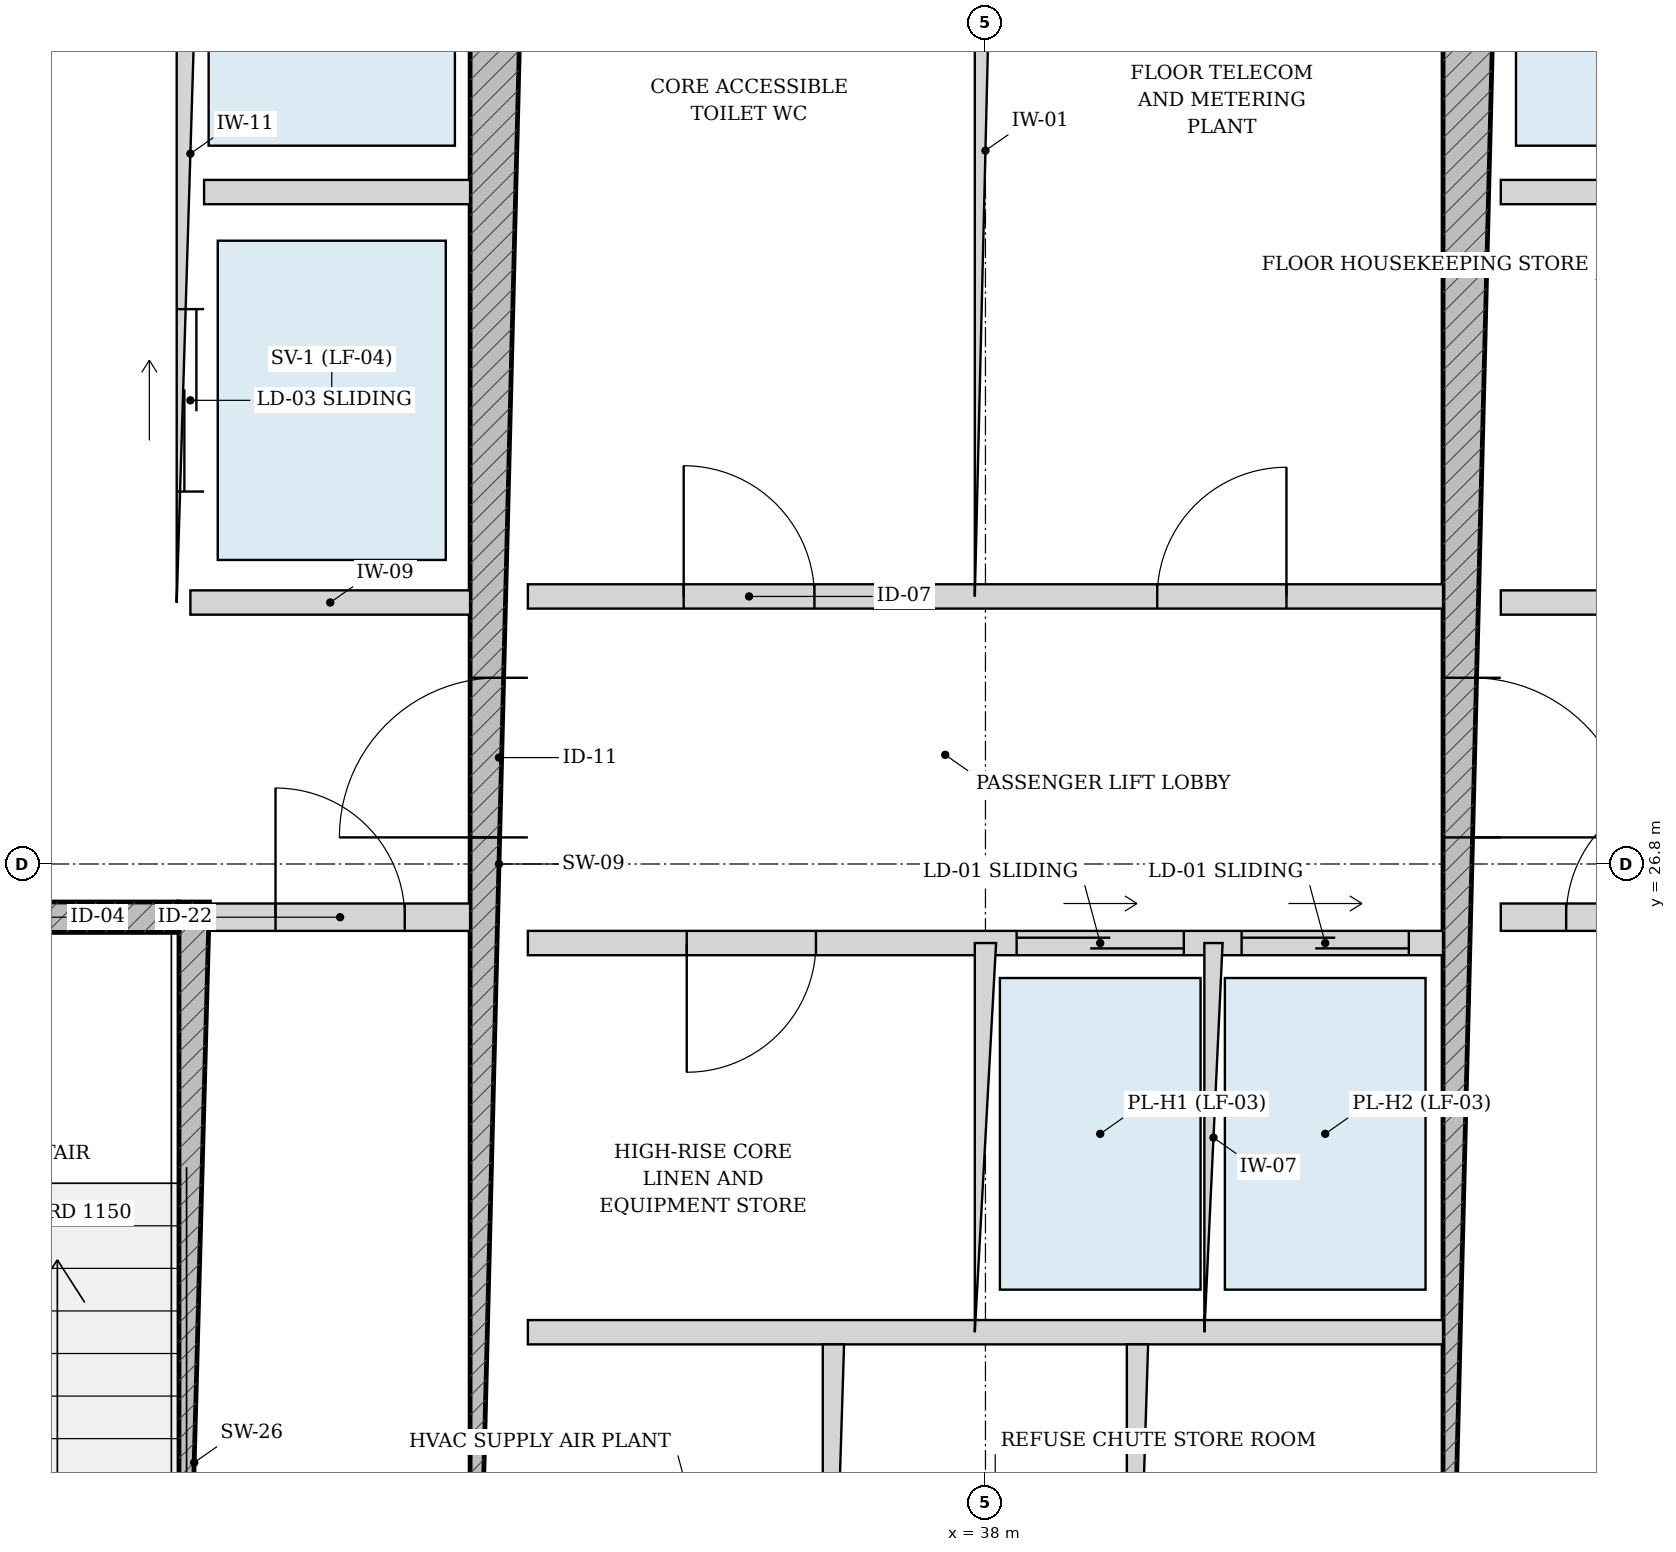
"""IFC4 building model, lengths in metres.
Left out: names, types, materials, properties, quantities, classifications, styles, units other than length and angle.
Written with IfcOpenShell. Run it as: python <this file> out.ifc"""

import sys

from ifc_helpers import new_model, si_unit, direction, frame, frame_2d, origin, place, context, subcontext, project, spatial, rectangle, extrude, source, transform, mapped, element, fill, save


model = new_model("IFC4")
c1 = context("Model", 3, precision=1e-05, world=origin(), true_north=direction((-0.2419218956, 0.970295726276)))
c2 = subcontext(c1, "Body", "Model", "MODEL_VIEW")
j1 = project(units=[si_unit("LENGTHUNIT", "METRE"), si_unit("PLANEANGLEUNIT", "RADIAN")], contexts=[c1])
p1 = place(None, origin())
s1 = spatial("IfcSite", under=j1, at=p1, CompositionType="ELEMENT")
p2 = place(p1, origin())
s2 = spatial("IfcBuilding", under=s1, at=p2, CompositionType="ELEMENT")
p3 = place(p2, frame((0.0, 0.0, 270.7)))
s3 = spatial("IfcBuildingStorey", under=s2, at=p3, CompositionType="ELEMENT", Elevation=270.7)
p4 = place(p3, frame((32.795, 19.175, 0.0), z_axis=(0.0, 0.0, 1.0), x_axis=(0.0, 1.0, 0.0)))
e1 = element("IfcWall", 1, at=p4, inside=s3, PredefinedType="SOLIDWALL", context=c2, shape_type="SweptSolid", body=[
    extrude(rectangle(XDim=7.375, YDim=0.2, at=frame_2d((3.688, 0.0))), origin(), (0.0, 0.0, 1.0), 3.49),
])
p5 = place(p3, frame((29.375, 26.45, 0.0), z_axis=(0.0, 0.0, 1.0), x_axis=(1.0, 0.0, 0.0)))
e2 = element("IfcWall", 2, at=p5, inside=s3, PredefinedType="SOLIDWALL", context=c2, shape_type="SweptSolid", body=[
    extrude(rectangle(XDim=3.32, YDim=0.2, at=frame_2d((1.66, 0.0))), origin(), (0.0, 0.0, 1.0), 3.49),
])
p6 = place(p5, frame((1.185, 0.0, 0.0)))
e3 = element("IfcOpeningElement", 3, at=p6, cuts=e2, PredefinedType="OPENING", context=c2, shape_type="SweptSolid", body=[
    extrude(rectangle(XDim=0.95, YDim=2.15, at=frame_2d((0.475, 1.075))), frame((0.0, 0.11, 0.0), z_axis=(0.0, -1.0, 0.0), x_axis=(1.0, 0.0, 0.0)), (0.0, 0.0, 1.0), 0.22),
])
p7 = place(p3, frame((34.8, 19.175, 0.0), z_axis=(0.0, 0.0, 1.0), x_axis=(0.0, 1.0, 0.0)))
e4 = element("IfcWall", 4, at=p7, inside=s3, PredefinedType="SHEAR", context=c2, shape_type="SweptSolid", body=[
    extrude(rectangle(XDim=15.25, YDim=0.38, at=frame_2d((7.625, 0.0))), origin(), (0.0, 0.0, 1.0), 3.49),
])
p8 = place(p7, frame((7.8, 0.0, 0.0)))
e5 = element("IfcOpeningElement", 5, at=p8, cuts=e4, PredefinedType="OPENING", context=c2, shape_type="SweptSolid", body=[
    extrude(rectangle(XDim=1.05, YDim=2.15, at=frame_2d((0.525, 1.075))), frame((0.0, 0.2, 0.0), z_axis=(0.0, -1.0, 0.0), x_axis=(1.0, 0.0, 0.0)), (0.0, 0.0, 1.0), 0.4),
])
p9 = place(p3, frame((41.2, 19.175, 0.0), z_axis=(0.0, 0.0, 1.0), x_axis=(0.0, 1.0, 0.0)))
e6 = element("IfcWall", 6, at=p9, inside=s3, PredefinedType="SHEAR", context=c2, shape_type="SweptSolid", body=[
    extrude(rectangle(XDim=15.25, YDim=0.38, at=frame_2d((7.625, 0.0))), origin(), (0.0, 0.0, 1.0), 3.49),
])
p10 = place(p9, frame((7.8, 0.0, 0.0)))
e7 = element("IfcOpeningElement", 7, at=p10, cuts=e6, PredefinedType="OPENING", context=c2, shape_type="SweptSolid", body=[
    extrude(rectangle(XDim=1.05, YDim=2.15, at=frame_2d((0.525, 1.075))), frame((0.0, 0.2, 0.0), z_axis=(0.0, -1.0, 0.0), x_axis=(1.0, 0.0, 0.0)), (0.0, 0.0, 1.0), 0.4),
])
p11 = place(p3, frame((32.9, 26.45, 0.0), z_axis=(0.0, 0.0, 1.0), x_axis=(1.0, 0.0, 0.0)))
e8 = element("IfcWall", 8, at=p11, inside=s3, PredefinedType="PARTITIONING", context=c2, shape_type="SweptSolid", body=[
    extrude(rectangle(XDim=1.71, YDim=0.18, at=frame_2d((0.855, 0.0))), origin(), (0.0, 0.0, 1.0), 3.49),
])
p12 = place(p11, frame((0.43, 0.0, 0.0)))
e9 = element("IfcOpeningElement", 9, at=p12, cuts=e8, PredefinedType="OPENING", context=c2, shape_type="SweptSolid", body=[
    extrude(rectangle(XDim=0.85, YDim=2.1, at=frame_2d((0.425, 1.05))), frame((0.0, 0.1, 0.0), z_axis=(0.0, -1.0, 0.0), x_axis=(1.0, 0.0, 0.0)), (0.0, 0.0, 1.0), 0.2),
])
p13 = place(p3, frame((41.39, 26.45, 0.0), z_axis=(0.0, 0.0, 1.0), x_axis=(1.0, 0.0, 0.0)))
e10 = element("IfcWall", 10, at=p13, inside=s3, PredefinedType="PARTITIONING", context=c2, shape_type="SweptSolid", body=[
    extrude(rectangle(XDim=1.71, YDim=0.18, at=frame_2d((0.855, 0.0))), origin(), (0.0, 0.0, 1.0), 3.49),
])
p14 = place(p13, frame((0.43, 0.0, 0.0)))
e11 = element("IfcOpeningElement", 11, at=p14, cuts=e10, PredefinedType="OPENING", context=c2, shape_type="SweptSolid", body=[
    extrude(rectangle(XDim=0.85, YDim=2.1, at=frame_2d((0.425, 1.05))), frame((0.0, 0.1, 0.0), z_axis=(0.0, -1.0, 0.0), x_axis=(1.0, 0.0, 0.0)), (0.0, 0.0, 1.0), 0.2),
])
p15 = place(p3, frame((32.77, 28.52, 0.0), z_axis=(0.0, 0.0, 1.0), x_axis=(0.0, 1.0, 0.0)))
e12 = element("IfcWall", 12, at=p15, inside=s3, PredefinedType="PARTITIONING", context=c2, shape_type="SweptSolid", body=[
    extrude(rectangle(XDim=5.905, YDim=0.18, at=frame_2d((2.953, 0.0))), origin(), (0.0, 0.0, 1.0), 3.49),
])
p16 = place(p15, frame((3.655, 0.0, 0.0)))
e13 = element("IfcOpeningElement", 13, at=p16, cuts=e12, PredefinedType="OPENING", context=c2, shape_type="SweptSolid", body=[
    extrude(rectangle(XDim=1.15, YDim=2.2, at=frame_2d((0.575, 1.1))), frame((0.0, 0.1, 0.0), z_axis=(0.0, -1.0, 0.0), x_axis=(1.0, 0.0, 0.0)), (0.0, 0.0, 1.0), 0.2),
])
p17 = place(p15, frame((0.73, 0.0, 0.0)))
e14 = element("IfcOpeningElement", 14, at=p17, cuts=e12, PredefinedType="OPENING", context=c2, shape_type="SweptSolid", body=[
    extrude(rectangle(XDim=1.2, YDim=2.25, at=frame_2d((0.6, 1.125))), frame((0.0, 0.1, 0.0), z_axis=(0.0, -1.0, 0.0), x_axis=(1.0, 0.0, 0.0)), (0.0, 0.0, 1.0), 0.2),
])
p18 = place(p3, frame((32.86, 31.22, 0.0), z_axis=(0.0, 0.0, 1.0), x_axis=(1.0, 0.0, 0.0)))
e15 = element("IfcWall", 15, at=p18, inside=s3, PredefinedType="PARTITIONING", context=c2, shape_type="SweptSolid", body=[
    extrude(rectangle(XDim=1.75, YDim=0.16, at=frame_2d((0.875, 0.0))), origin(), (0.0, 0.0, 1.0), 3.49),
])
p19 = place(p3, frame((32.77, 28.52, 0.0), z_axis=(0.0, 0.0, 1.0), x_axis=(1.0, 0.0, 0.0)))
e16 = element("IfcWall", 16, at=p19, inside=s3, PredefinedType="PARTITIONING", context=c2, shape_type="SweptSolid", body=[
    extrude(rectangle(XDim=1.84, YDim=0.16, at=frame_2d((0.92, 0.0))), origin(), (0.0, 0.0, 1.0), 3.49),
])
p20 = place(p3, frame((41.39, 31.22, 0.0), z_axis=(0.0, 0.0, 1.0), x_axis=(1.0, 0.0, 0.0)))
e17 = element("IfcWall", 17, at=p20, inside=s3, PredefinedType="PARTITIONING", context=c2, shape_type="SweptSolid", body=[
    extrude(rectangle(XDim=1.75, YDim=0.16, at=frame_2d((0.875, 0.0))), origin(), (0.0, 0.0, 1.0), 3.49),
])
p21 = place(p3, frame((41.39, 28.52, 0.0), z_axis=(0.0, 0.0, 1.0), x_axis=(1.0, 0.0, 0.0)))
e18 = element("IfcWall", 18, at=p21, inside=s3, PredefinedType="PARTITIONING", context=c2, shape_type="SweptSolid", body=[
    extrude(rectangle(XDim=1.84, YDim=0.16, at=frame_2d((0.92, 0.0))), origin(), (0.0, 0.0, 1.0), 3.49),
])
p22 = place(p3, frame((34.99, 28.56, 0.0), z_axis=(0.0, 0.0, 1.0), x_axis=(1.0, 0.0, 0.0)))
e19 = element("IfcWall", 19, at=p22, inside=s3, PredefinedType="PARTITIONING", context=c2, shape_type="SweptSolid", body=[
    extrude(rectangle(XDim=6.02, YDim=0.16, at=frame_2d((3.01, 0.0))), origin(), (0.0, 0.0, 1.0), 3.49),
])
p23 = place(p22, frame((1.025, 0.0, 0.0)))
e20 = element("IfcOpeningElement", 20, at=p23, cuts=e19, PredefinedType="OPENING", context=c2, shape_type="SweptSolid", body=[
    extrude(rectangle(XDim=0.86, YDim=2.1, at=frame_2d((0.43, 1.05))), frame((0.0, 0.09, 0.0), z_axis=(0.0, -1.0, 0.0), x_axis=(1.0, 0.0, 0.0)), (0.0, 0.0, 1.0), 0.18),
])
p24 = place(p22, frame((4.14, 0.0, 0.0)))
e21 = element("IfcOpeningElement", 21, at=p24, cuts=e19, PredefinedType="OPENING", context=c2, shape_type="SweptSolid", body=[
    extrude(rectangle(XDim=0.85, YDim=2.1, at=frame_2d((0.425, 1.05))), frame((0.0, 0.09, 0.0), z_axis=(0.0, -1.0, 0.0), x_axis=(1.0, 0.0, 0.0)), (0.0, 0.0, 1.0), 0.18),
])
p25 = place(p3, frame((38.0, 28.56, 0.0), z_axis=(0.0, 0.0, 1.0), x_axis=(0.0, 1.0, 0.0)))
e22 = element("IfcWall", 22, at=p25, inside=s3, PredefinedType="PARTITIONING", context=c2, shape_type="SweptSolid", body=[
    extrude(rectangle(XDim=5.865, YDim=0.14, at=frame_2d((2.933, 0.0))), origin(), (0.0, 0.0, 1.0), 3.49),
])
p26 = place(p3, frame((34.99, 26.28, 0.0), z_axis=(0.0, 0.0, 1.0), x_axis=(1.0, 0.0, 0.0)))
e23 = element("IfcWall", 23, at=p26, inside=s3, PredefinedType="PARTITIONING", context=c2, shape_type="SweptSolid", body=[
    extrude(rectangle(XDim=6.02, YDim=0.16, at=frame_2d((3.01, 0.0))), origin(), (0.0, 0.0, 1.0), 3.49),
])
p27 = place(p26, frame((1.045, 0.0, 0.0)))
e24 = element("IfcOpeningElement", 24, at=p27, cuts=e23, PredefinedType="OPENING", context=c2, shape_type="SweptSolid", body=[
    extrude(rectangle(XDim=0.85, YDim=2.1, at=frame_2d((0.425, 1.05))), frame((0.0, 0.09, 0.0), z_axis=(0.0, -1.0, 0.0), x_axis=(1.0, 0.0, 0.0)), (0.0, 0.0, 1.0), 0.18),
])
p28 = place(p26, frame((3.215, 0.0, 0.0)))
e25 = element("IfcOpeningElement", 25, at=p28, cuts=e23, PredefinedType="OPENING", context=c2, shape_type="SweptSolid", body=[
    extrude(rectangle(XDim=1.1, YDim=2.2, at=frame_2d((0.55, 1.1))), frame((0.0, 0.09, 0.0), z_axis=(0.0, -1.0, 0.0), x_axis=(1.0, 0.0, 0.0)), (0.0, 0.0, 1.0), 0.18),
])
p29 = place(p26, frame((4.695, 0.0, 0.0)))
e26 = element("IfcOpeningElement", 26, at=p29, cuts=e23, PredefinedType="OPENING", context=c2, shape_type="SweptSolid", body=[
    extrude(rectangle(XDim=1.1, YDim=2.2, at=frame_2d((0.55, 1.1))), frame((0.0, 0.09, 0.0), z_axis=(0.0, -1.0, 0.0), x_axis=(1.0, 0.0, 0.0)), (0.0, 0.0, 1.0), 0.18),
])
p30 = place(p3, frame((34.99, 23.72, 0.0), z_axis=(0.0, 0.0, 1.0), x_axis=(1.0, 0.0, 0.0)))
e27 = element("IfcWall", 27, at=p30, inside=s3, PredefinedType="PARTITIONING", context=c2, shape_type="SweptSolid", body=[
    extrude(rectangle(XDim=6.02, YDim=0.16, at=frame_2d((3.01, 0.0))), origin(), (0.0, 0.0, 1.0), 3.49),
])
p31 = place(p3, frame((38.0, 23.72, 0.0), z_axis=(0.0, 0.0, 1.0), x_axis=(0.0, 1.0, 0.0)))
e28 = element("IfcWall", 28, at=p31, inside=s3, PredefinedType="PARTITIONING", context=c2, shape_type="SweptSolid", body=[
    extrude(rectangle(XDim=2.56, YDim=0.14, at=frame_2d((1.28, 0.0))), origin(), (0.0, 0.0, 1.0), 3.49),
])
p32 = place(p3, frame((39.5, 23.72, 0.0), z_axis=(0.0, 0.0, 1.0), x_axis=(0.0, 1.0, 0.0)))
e29 = element("IfcWall", 29, at=p32, inside=s3, PredefinedType="PARTITIONING", context=c2, shape_type="SweptSolid", body=[
    extrude(rectangle(XDim=2.56, YDim=0.12, at=frame_2d((1.28, 0.0))), origin(), (0.0, 0.0, 1.0), 3.49),
])
p33 = place(p3, frame((37.0, 19.175, 0.0), z_axis=(0.0, 0.0, 1.0), x_axis=(0.0, 1.0, 0.0)))
e30 = element("IfcWall", 30, at=p33, inside=s3, PredefinedType="PARTITIONING", context=c2, shape_type="SweptSolid", body=[
    extrude(rectangle(XDim=4.465, YDim=0.14, at=frame_2d((2.232, 0.0))), origin(), (0.0, 0.0, 1.0), 3.49),
])
p34 = place(p33, frame((1.808, 0.0, 0.0)))
e31 = element("IfcOpeningElement", 31, at=p34, cuts=e30, PredefinedType="OPENING", context=c2, shape_type="SweptSolid", body=[
    extrude(rectangle(XDim=0.85, YDim=2.1, at=frame_2d((0.425, 1.05))), frame((0.0, 0.08, 0.0), z_axis=(0.0, -1.0, 0.0), x_axis=(1.0, 0.0, 0.0)), (0.0, 0.0, 1.0), 0.16),
])
p35 = place(p3, frame((39.0, 19.175, 0.0), z_axis=(0.0, 0.0, 1.0), x_axis=(0.0, 1.0, 0.0)))
e32 = element("IfcWall", 32, at=p35, inside=s3, PredefinedType="PARTITIONING", context=c2, shape_type="SweptSolid", body=[
    extrude(rectangle(XDim=4.465, YDim=0.14, at=frame_2d((2.232, 0.0))), origin(), (0.0, 0.0, 1.0), 3.49),
])
p36 = place(p35, frame((1.808, 0.0, 0.0)))
e33 = element("IfcOpeningElement", 33, at=p36, cuts=e32, PredefinedType="OPENING", context=c2, shape_type="SweptSolid", body=[
    extrude(rectangle(XDim=0.85, YDim=2.1, at=frame_2d((0.425, 1.05))), frame((0.0, 0.08, 0.0), z_axis=(0.0, -1.0, 0.0), x_axis=(1.0, 0.0, 0.0)), (0.0, 0.0, 1.0), 0.16),
])
m1 = source(origin(), c2, "Body", "SweptSolid", [
    extrude(rectangle(XDim=1.05, YDim=2.15, at=frame_2d((0.525, 1.075))), frame((0.0, 0.025, 0.0), z_axis=(0.0, -1.0, 0.0), x_axis=(1.0, 0.0, 0.0)), (0.0, 0.0, 1.0), 0.05),
])
p37 = place(p8, origin())
e34 = element("IfcDoor", 34, at=p37, inside=s3, OperationType="SINGLE_SWING_LEFT", PredefinedType="DOOR", context=c2, shape_type="MappedRepresentation", body=[
    mapped(m1, transform((0.0, 0.0, 0.0), scale=1.0)),
])
fill(e5, e34)
p38 = place(p10, frame((1.05, 0.0, 0.0), z_axis=(0.0, 0.0, 1.0), x_axis=(-1.0, 0.0, 0.0)))
e35 = element("IfcDoor", 35, at=p38, inside=s3, OperationType="SINGLE_SWING_RIGHT", PredefinedType="DOOR", context=c2, shape_type="MappedRepresentation", body=[
    mapped(m1, transform((0.0, 0.0, 0.0), scale=1.0)),
])
fill(e7, e35)
m2 = source(origin(), c2, "Body", "SweptSolid", [
    extrude(rectangle(XDim=0.85, YDim=2.1, at=frame_2d((0.425, 1.05))), frame((0.0, 0.025, 0.0), z_axis=(0.0, -1.0, 0.0), x_axis=(1.0, 0.0, 0.0)), (0.0, 0.0, 1.0), 0.05),
])
p39 = place(p12, origin())
e36 = element("IfcDoor", 36, at=p39, inside=s3, OperationType="SINGLE_SWING_LEFT", PredefinedType="DOOR", context=c2, shape_type="MappedRepresentation", body=[
    mapped(m2, transform((0.0, 0.0, 0.0), scale=1.0)),
])
fill(e9, e36)
p40 = place(p14, origin())
e37 = element("IfcDoor", 37, at=p40, inside=s3, OperationType="SINGLE_SWING_RIGHT", PredefinedType="DOOR", context=c2, shape_type="MappedRepresentation", body=[
    mapped(m2, transform((0.0, 0.0, 0.0), scale=1.0)),
])
fill(e11, e37)
m3 = source(origin(), c2, "Body", "SweptSolid", [
    extrude(rectangle(XDim=0.86, YDim=2.1, at=frame_2d((0.43, 1.05))), frame((0.0, 0.025, 0.0), z_axis=(0.0, -1.0, 0.0), x_axis=(1.0, 0.0, 0.0)), (0.0, 0.0, 1.0), 0.05),
])
p41 = place(p23, origin())
e38 = element("IfcDoor", 38, at=p41, inside=s3, OperationType="SINGLE_SWING_LEFT", PredefinedType="DOOR", context=c2, shape_type="MappedRepresentation", body=[
    mapped(m3, transform((0.0, 0.0, 0.0), scale=1.0)),
])
fill(e20, e38)
p42 = place(p24, origin())
e39 = element("IfcDoor", 39, at=p42, inside=s3, OperationType="SINGLE_SWING_RIGHT", PredefinedType="DOOR", context=c2, shape_type="MappedRepresentation", body=[
    mapped(m2, transform((0.0, 0.0, 0.0), scale=1.0)),
])
fill(e21, e39)
p43 = place(p27, frame((0.85, 0.0, 0.0), z_axis=(0.0, 0.0, 1.0), x_axis=(-1.0, 0.0, 0.0)))
e40 = element("IfcDoor", 40, at=p43, inside=s3, OperationType="SINGLE_SWING_RIGHT", PredefinedType="DOOR", context=c2, shape_type="MappedRepresentation", body=[
    mapped(m2, transform((0.0, 0.0, 0.0), scale=1.0)),
])
fill(e24, e40)
m4 = source(origin(), c2, "Body", "SweptSolid", [
    extrude(rectangle(XDim=1.2, YDim=2.25, at=frame_2d((0.6, 1.125))), frame((0.0, 0.025, 0.0), z_axis=(0.0, -1.0, 0.0), x_axis=(1.0, 0.0, 0.0)), (0.0, 0.0, 1.0), 0.05),
])
p44 = place(p17, origin())
e41 = element("IfcDoor", 41, at=p44, inside=s3, OperationType="DOUBLE_DOOR_SLIDING", PredefinedType="DOOR", context=c2, shape_type="MappedRepresentation", body=[
    mapped(m4, transform((0.0, 0.0, 0.0), scale=1.0)),
])
fill(e14, e41)
m5 = source(origin(), c2, "Body", "SweptSolid", [
    extrude(rectangle(XDim=1.1, YDim=2.2, at=frame_2d((0.55, 1.1))), frame((0.0, 0.025, 0.0), z_axis=(0.0, -1.0, 0.0), x_axis=(1.0, 0.0, 0.0)), (0.0, 0.0, 1.0), 0.05),
])
p45 = place(p28, origin())
e42 = element("IfcDoor", 42, at=p45, inside=s3, OperationType="DOUBLE_DOOR_SLIDING", PredefinedType="DOOR", context=c2, shape_type="MappedRepresentation", body=[
    mapped(m5, transform((0.0, 0.0, 0.0), scale=1.0)),
])
fill(e25, e42)
p46 = place(p29, origin())
e43 = element("IfcDoor", 43, at=p46, inside=s3, OperationType="DOUBLE_DOOR_SLIDING", PredefinedType="DOOR", context=c2, shape_type="MappedRepresentation", body=[
    mapped(m5, transform((0.0, 0.0, 0.0), scale=1.0)),
])
fill(e26, e43)
save(model, sys.argv[1])
